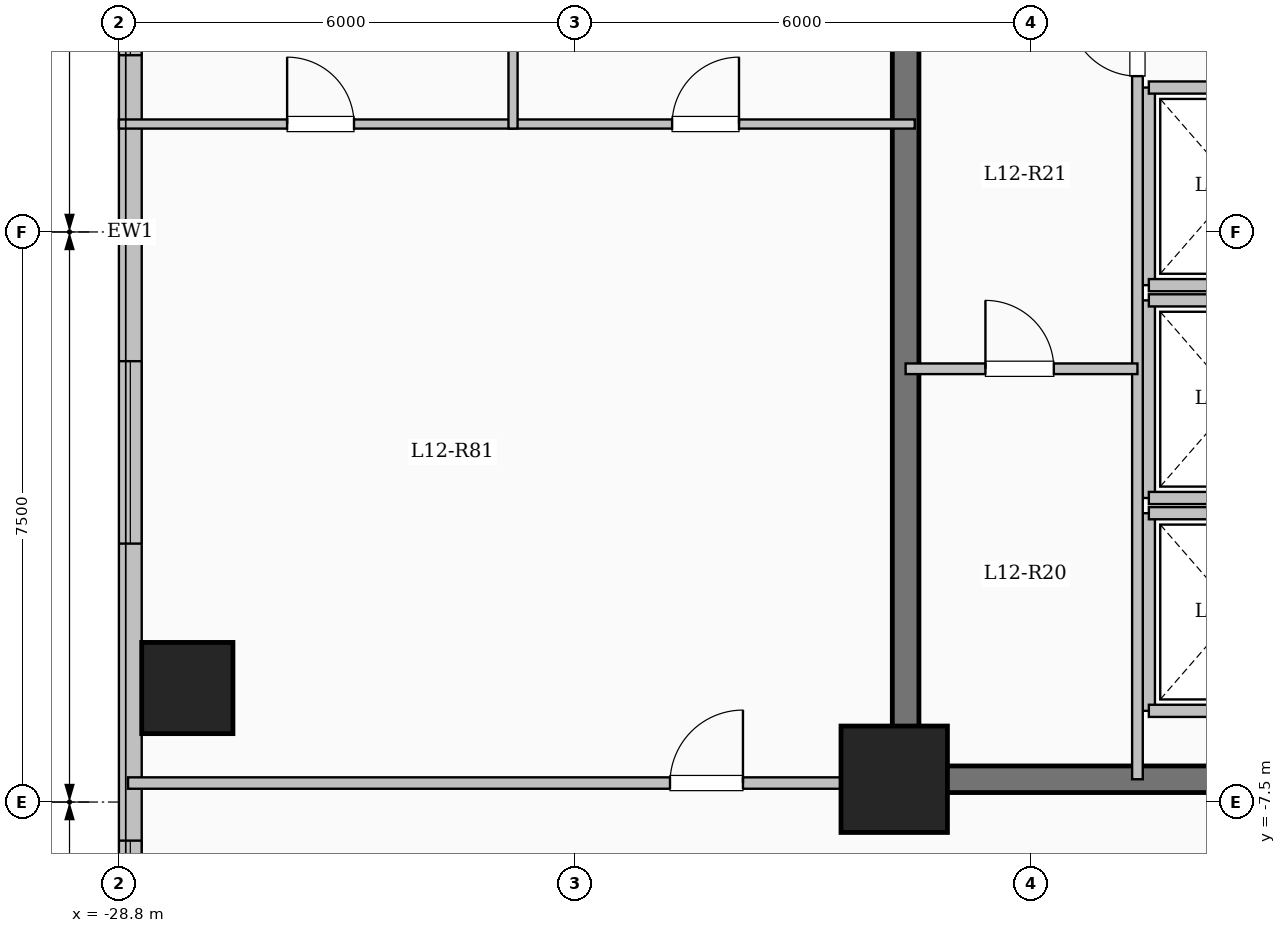
"""IFC4 building model, lengths in metres.
Left out: names, types, materials, properties, quantities, classifications, styles, units other than length and angle.
Written with IfcOpenShell. Run it as: python <this file> out.ifc"""

import sys

from ifc_helpers import new_model, si_unit, direction, frame, frame_2d, origin, origin_2d, place, context, subcontext, project, spatial, rectangle, extrude, element, fill, save


model = new_model("IFC4")
c1 = context("Model", 3, precision=1e-05, world=origin(), true_north=direction((0.0, 1.0)))
c2 = subcontext(c1, "Body", "Model", "MODEL_VIEW")
j1 = project(units=[si_unit("LENGTHUNIT", "METRE"), si_unit("PLANEANGLEUNIT", "RADIAN")], contexts=[c1])
p1 = place(None, origin())
s1 = spatial("IfcSite", under=j1, at=p1, CompositionType="ELEMENT")
p2 = place(p1, origin())
s2 = spatial("IfcBuilding", under=s1, at=p2, CompositionType="ELEMENT")
p3 = place(p2, frame((0.0, 0.0, 47.45)))
s3 = spatial("IfcBuildingStorey", under=s2, at=p3, CompositionType="ELEMENT", Elevation=47.45)
p4 = place(p3, frame((-18.6, -7.2, 0.0), z_axis=(0.0, 0.0, 1.0), x_axis=(1.0, 0.0, 0.0)))
e1 = element("IfcColumn", 1, at=p4, inside=s3, PredefinedType="COLUMN", context=c2, shape_type="SweptSolid", body=[
    extrude(rectangle(XDim=1.4, YDim=1.4, at=origin_2d()), origin(), (0.0, 0.0, 1.0), 3.35),
])
p5 = place(p3, frame((-27.9, -6.0, 0.0), z_axis=(0.0, 0.0, 1.0), x_axis=(1.0, 0.0, 0.0)))
e2 = element("IfcColumn", 2, at=p5, inside=s3, PredefinedType="COLUMN", context=c2, shape_type="SweptSolid", body=[
    extrude(rectangle(XDim=1.2, YDim=1.2, at=origin_2d()), origin(), (0.0, 0.0, 1.0), 3.35),
])
p6 = place(p3, frame((-28.65, -19.05, 0.0), z_axis=(0.0, 0.0, 1.0), x_axis=(0.0, 1.0, 0.0)))
e3 = element("IfcWall", 3, at=p6, inside=s3, PredefinedType="SOLIDWALL", context=c2, shape_type="SweptSolid", body=[
    extrude(rectangle(XDim=38.1, YDim=0.3, at=frame_2d((19.05, 0.0))), origin(), (0.0, 0.0, 1.0), 3.1),
])
p7 = place(p6, frame((3.15, 0.0, 0.9)))
e4 = element("IfcOpeningElement", 4, at=p7, cuts=e3, PredefinedType="OPENING", context=c2, shape_type="SweptSolid", body=[
    extrude(rectangle(XDim=2.4, YDim=1.8, at=frame_2d((1.2, 0.9))), frame((0.0, 0.16, 0.0), z_axis=(0.0, -1.0, 0.0), x_axis=(1.0, 0.0, 0.0)), (0.0, 0.0, 1.0), 0.32),
])
p8 = place(p6, frame((9.542, 0.0, 0.9)))
e5 = element("IfcOpeningElement", 5, at=p8, cuts=e3, PredefinedType="OPENING", context=c2, shape_type="SweptSolid", body=[
    extrude(rectangle(XDim=1.5, YDim=1.65, at=frame_2d((0.75, 0.825))), frame((0.0, 0.16, 0.0), z_axis=(0.0, -1.0, 0.0), x_axis=(1.0, 0.0, 0.0)), (0.0, 0.0, 1.0), 0.32),
])
p9 = place(p6, frame((14.95, 0.0, 0.9)))
e6 = element("IfcOpeningElement", 6, at=p9, cuts=e3, PredefinedType="OPENING", context=c2, shape_type="SweptSolid", body=[
    extrude(rectangle(XDim=2.4, YDim=1.8, at=frame_2d((1.2, 0.9))), frame((0.0, 0.16, 0.0), z_axis=(0.0, -1.0, 0.0), x_axis=(1.0, 0.0, 0.0)), (0.0, 0.0, 1.0), 0.32),
])
p10 = place(p6, frame((21.375, 0.0, 0.9)))
e7 = element("IfcOpeningElement", 7, at=p10, cuts=e3, PredefinedType="OPENING", context=c2, shape_type="SweptSolid", body=[
    extrude(rectangle(XDim=1.8, YDim=1.65, at=frame_2d((0.9, 0.825))), frame((0.0, 0.16, 0.0), z_axis=(0.0, -1.0, 0.0), x_axis=(1.0, 0.0, 0.0)), (0.0, 0.0, 1.0), 0.32),
])
p11 = place(p6, frame((25.925, 0.0, 0.9)))
e8 = element("IfcOpeningElement", 8, at=p11, cuts=e3, PredefinedType="OPENING", context=c2, shape_type="SweptSolid", body=[
    extrude(rectangle(XDim=2.0, YDim=1.7, at=frame_2d((1.0, 0.85))), frame((0.0, 0.16, 0.0), z_axis=(0.0, -1.0, 0.0), x_axis=(1.0, 0.0, 0.0)), (0.0, 0.0, 1.0), 0.32),
])
p12 = place(p6, frame((30.175, 0.0, 0.95)))
e9 = element("IfcOpeningElement", 9, at=p12, cuts=e3, PredefinedType="OPENING", context=c2, shape_type="SweptSolid", body=[
    extrude(rectangle(XDim=1.0, YDim=1.5, at=frame_2d((0.5, 0.75))), frame((0.0, 0.16, 0.0), z_axis=(0.0, -1.0, 0.0), x_axis=(1.0, 0.0, 0.0)), (0.0, 0.0, 1.0), 0.32),
])
p13 = place(p6, frame((33.85, 0.0, 0.9)))
e10 = element("IfcOpeningElement", 10, at=p13, cuts=e3, PredefinedType="OPENING", context=c2, shape_type="SweptSolid", body=[
    extrude(rectangle(XDim=2.0, YDim=1.7, at=frame_2d((1.0, 0.85))), frame((0.0, 0.16, 0.0), z_axis=(0.0, -1.0, 0.0), x_axis=(1.0, 0.0, 0.0)), (0.0, 0.0, 1.0), 0.32),
])
p14 = place(p3, frame((-15.25, -6.3, 0.0), z_axis=(0.0, 0.0, 1.0), x_axis=(0.0, 1.0, 0.0)))
e11 = element("IfcWall", 11, at=p14, inside=s3, PredefinedType="SOLIDWALL", context=c2, shape_type="SweptSolid", body=[
    extrude(rectangle(XDim=2.6, YDim=0.16, at=frame_2d((1.3, 0.0))), origin(), (0.0, 0.0, 1.0), 3.1),
])
for number, where, z_axis, x_axis in (
    (12, (-15.25, -6.3, 0.0), (0.0, 0.0, 1.0), (1.0, 0.0, 0.0)),
    (13, (-15.25, -3.7, 0.0), (0.0, 0.0, 1.0), (1.0, 0.0, 0.0)),
):
    element("IfcWall", number, at=place(p3, frame(where, z_axis=z_axis, x_axis=x_axis)), inside=s3, PredefinedType="SOLIDWALL", context=c2, shape_type="SweptSolid", body=[
        extrude(rectangle(XDim=2.3, YDim=0.16, at=frame_2d((1.15, 0.0))), origin(), (0.0, 0.0, 1.0), 3.1),
    ])
p15 = place(p3, frame((-15.25, -3.5, 0.0), z_axis=(0.0, 0.0, 1.0), x_axis=(0.0, 1.0, 0.0)))
e14 = element("IfcWall", 14, at=p15, inside=s3, PredefinedType="SOLIDWALL", context=c2, shape_type="SweptSolid", body=[
    extrude(rectangle(XDim=2.6, YDim=0.16, at=frame_2d((1.3, 0.0))), origin(), (0.0, 0.0, 1.0), 3.1),
])
for number, where, z_axis, x_axis in (
    (15, (-15.25, -3.5, 0.0), (0.0, 0.0, 1.0), (1.0, 0.0, 0.0)),
    (16, (-15.25, -0.9, 0.0), (0.0, 0.0, 1.0), (1.0, 0.0, 0.0)),
):
    element("IfcWall", number, at=place(p3, frame(where, z_axis=z_axis, x_axis=x_axis)), inside=s3, PredefinedType="SOLIDWALL", context=c2, shape_type="SweptSolid", body=[
        extrude(rectangle(XDim=2.3, YDim=0.16, at=frame_2d((1.15, 0.0))), origin(), (0.0, 0.0, 1.0), 3.1),
    ])
p16 = place(p3, frame((-15.25, -0.7, 0.0), z_axis=(0.0, 0.0, 1.0), x_axis=(0.0, 1.0, 0.0)))
e17 = element("IfcWall", 17, at=p16, inside=s3, PredefinedType="SOLIDWALL", context=c2, shape_type="SweptSolid", body=[
    extrude(rectangle(XDim=2.6, YDim=0.16, at=frame_2d((1.3, 0.0))), origin(), (0.0, 0.0, 1.0), 3.1),
])
for number, where, z_axis, x_axis in (
    (18, (-15.25, -0.7, 0.0), (0.0, 0.0, 1.0), (1.0, 0.0, 0.0)),
    (19, (-15.25, 1.9, 0.0), (0.0, 0.0, 1.0), (1.0, 0.0, 0.0)),
):
    element("IfcWall", number, at=place(p3, frame(where, z_axis=z_axis, x_axis=x_axis)), inside=s3, PredefinedType="SOLIDWALL", context=c2, shape_type="SweptSolid", body=[
        extrude(rectangle(XDim=2.3, YDim=0.16, at=frame_2d((1.15, 0.0))), origin(), (0.0, 0.0, 1.0), 3.1),
    ])
p17 = place(p3, frame((-18.45, -7.375, 0.0), z_axis=(0.0, 0.0, 1.0), x_axis=(0.0, 1.0, 0.0)))
e20 = element("IfcWall", 20, at=p17, inside=s3, PredefinedType="SHEAR", context=c2, shape_type="SweptSolid", body=[
    extrude(rectangle(XDim=14.05, YDim=0.35, at=frame_2d((7.025, 0.0))), origin(), (0.0, 0.0, 1.0), 3.35),
])
p18 = place(p3, frame((-18.625, -7.2, 0.0), z_axis=(0.0, 0.0, 1.0), x_axis=(1.0, 0.0, 0.0)))
e21 = element("IfcWall", 21, at=p18, inside=s3, PredefinedType="SHEAR", context=c2, shape_type="SweptSolid", body=[
    extrude(rectangle(XDim=8.55, YDim=0.35, at=frame_2d((4.275, 0.0))), origin(), (0.0, 0.0, 1.0), 3.35),
])
p19 = place(p3, frame((-15.4, -7.2, 0.0), z_axis=(0.0, 0.0, 1.0), x_axis=(0.0, 1.0, 0.0)))
e22 = element("IfcWall", 22, at=p19, inside=s3, PredefinedType="PARTITIONING", context=c2, shape_type="SweptSolid", body=[
    extrude(rectangle(XDim=10.45, YDim=0.14, at=frame_2d((5.225, 0.0))), origin(), (0.0, 0.0, 1.0), 3.1),
])
p20 = place(p19, frame((9.25, 0.0, 0.0)))
e23 = element("IfcOpeningElement", 23, at=p20, cuts=e22, PredefinedType="OPENING", context=c2, shape_type="SweptSolid", body=[
    extrude(rectangle(XDim=0.9, YDim=2.08, at=frame_2d((0.45, 1.04))), frame((0.0, 0.08, 0.0), z_axis=(0.0, -1.0, 0.0), x_axis=(1.0, 0.0, 0.0)), (0.0, 0.0, 1.0), 0.16),
])
p21 = place(p3, frame((-18.45, -1.8, 0.0), z_axis=(0.0, 0.0, 1.0), x_axis=(1.0, 0.0, 0.0)))
e24 = element("IfcWall", 24, at=p21, inside=s3, PredefinedType="PARTITIONING", context=c2, shape_type="SweptSolid", body=[
    extrude(rectangle(XDim=3.05, YDim=0.14, at=frame_2d((1.525, 0.0))), origin(), (0.0, 0.0, 1.0), 3.1),
])
p22 = place(p21, frame((1.05, 0.0, 0.0)))
e25 = element("IfcOpeningElement", 25, at=p22, cuts=e24, PredefinedType="OPENING", context=c2, shape_type="SweptSolid", body=[
    extrude(rectangle(XDim=0.9, YDim=2.08, at=frame_2d((0.45, 1.04))), frame((0.0, 0.08, 0.0), z_axis=(0.0, -1.0, 0.0), x_axis=(1.0, 0.0, 0.0)), (0.0, 0.0, 1.0), 0.16),
])
p23 = place(p3, frame((-28.68, -7.25, 0.0), z_axis=(0.0, 0.0, 1.0), x_axis=(1.0, 0.0, 0.0)))
e26 = element("IfcWall", 26, at=p23, inside=s3, PredefinedType="PARTITIONING", context=c2, shape_type="SweptSolid", body=[
    extrude(rectangle(XDim=10.23, YDim=0.15, at=frame_2d((5.115, 0.0))), origin(), (0.0, 0.0, 1.0), 3.1),
])
p24 = place(p23, frame((7.13, 0.0, 0.0)))
e27 = element("IfcOpeningElement", 27, at=p24, cuts=e26, PredefinedType="OPENING", context=c2, shape_type="SweptSolid", body=[
    extrude(rectangle(XDim=0.96, YDim=2.15, at=frame_2d((0.48, 1.075))), frame((0.0, 0.085, 0.0), z_axis=(0.0, -1.0, 0.0), x_axis=(1.0, 0.0, 0.0)), (0.0, 0.0, 1.0), 0.17),
])
p25 = place(p3, frame((-28.8, 1.42, 0.0), z_axis=(0.0, 0.0, 1.0), x_axis=(1.0, 0.0, 0.0)))
e28 = element("IfcWall", 28, at=p25, inside=s3, PredefinedType="PARTITIONING", context=c2, shape_type="SweptSolid", body=[
    extrude(rectangle(XDim=10.47, YDim=0.12, at=frame_2d((5.235, 0.0))), origin(), (0.0, 0.0, 1.0), 3.1),
])
p26 = place(p25, frame((2.213, 0.0, 0.0)))
e29 = element("IfcOpeningElement", 29, at=p26, cuts=e28, PredefinedType="OPENING", context=c2, shape_type="SweptSolid", body=[
    extrude(rectangle(XDim=0.88, YDim=2.1, at=frame_2d((0.44, 1.05))), frame((0.0, 0.07, 0.0), z_axis=(0.0, -1.0, 0.0), x_axis=(1.0, 0.0, 0.0)), (0.0, 0.0, 1.0), 0.14),
])
p27 = place(p25, frame((7.278, 0.0, 0.0)))
e30 = element("IfcOpeningElement", 30, at=p27, cuts=e28, PredefinedType="OPENING", context=c2, shape_type="SweptSolid", body=[
    extrude(rectangle(XDim=0.88, YDim=2.1, at=frame_2d((0.44, 1.05))), frame((0.0, 0.07, 0.0), z_axis=(0.0, -1.0, 0.0), x_axis=(1.0, 0.0, 0.0)), (0.0, 0.0, 1.0), 0.14),
])
p28 = place(p3, frame((-23.615, 1.36, 0.0), z_axis=(0.0, 0.0, 1.0), x_axis=(0.0, 1.0, 0.0)))
e31 = element("IfcWall", 31, at=p28, inside=s3, PredefinedType="PARTITIONING", context=c2, shape_type="SweptSolid", body=[
    extrude(rectangle(XDim=3.58, YDim=0.12, at=frame_2d((1.79, 0.0))), origin(), (0.0, 0.0, 1.0), 3.1),
])
p29 = place(p8, origin())
e32 = element("IfcWindow", 32, at=p29, inside=s3, PartitioningType="SINGLE_PANEL", PredefinedType="WINDOW", context=c2, shape_type="SweptSolid", body=[
    extrude(rectangle(XDim=1.5, YDim=1.65, at=frame_2d((0.75, 0.825))), frame((0.0, 0.03, 0.0), z_axis=(0.0, -1.0, 0.0), x_axis=(1.0, 0.0, 0.0)), (0.0, 0.0, 1.0), 0.06),
])
fill(e5, e32)
p30 = place(p9, origin())
e33 = element("IfcWindow", 33, at=p30, inside=s3, PartitioningType="SINGLE_PANEL", PredefinedType="WINDOW", context=c2, shape_type="SweptSolid", body=[
    extrude(rectangle(XDim=2.4, YDim=1.8, at=frame_2d((1.2, 0.9))), frame((0.0, 0.03, 0.0), z_axis=(0.0, -1.0, 0.0), x_axis=(1.0, 0.0, 0.0)), (0.0, 0.0, 1.0), 0.06),
])
fill(e6, e33)
p31 = place(p10, origin())
e34 = element("IfcWindow", 34, at=p31, inside=s3, PartitioningType="SINGLE_PANEL", PredefinedType="WINDOW", context=c2, shape_type="SweptSolid", body=[
    extrude(rectangle(XDim=1.8, YDim=1.65, at=frame_2d((0.9, 0.825))), frame((0.0, 0.03, 0.0), z_axis=(0.0, -1.0, 0.0), x_axis=(1.0, 0.0, 0.0)), (0.0, 0.0, 1.0), 0.06),
])
fill(e7, e34)
p32 = place(p20, origin())
e35 = element("IfcDoor", 35, at=p32, inside=s3, OperationType="SINGLE_SWING_RIGHT", PredefinedType="DOOR", context=c2, shape_type="SweptSolid", body=[
    extrude(rectangle(XDim=0.9, YDim=2.08, at=frame_2d((0.45, 1.04))), frame((0.0, 0.025, 0.0), z_axis=(0.0, -1.0, 0.0), x_axis=(1.0, 0.0, 0.0)), (0.0, 0.0, 1.0), 0.05),
])
fill(e23, e35)
p33 = place(p22, origin())
e36 = element("IfcDoor", 36, at=p33, inside=s3, OperationType="SINGLE_SWING_LEFT", PredefinedType="DOOR", context=c2, shape_type="SweptSolid", body=[
    extrude(rectangle(XDim=0.9, YDim=2.08, at=frame_2d((0.45, 1.04))), frame((0.0, 0.025, 0.0), z_axis=(0.0, -1.0, 0.0), x_axis=(1.0, 0.0, 0.0)), (0.0, 0.0, 1.0), 0.05),
])
fill(e25, e36)
p34 = place(p24, origin())
e37 = element("IfcDoor", 37, at=p34, inside=s3, OperationType="SINGLE_SWING_RIGHT", PredefinedType="DOOR", context=c2, shape_type="SweptSolid", body=[
    extrude(rectangle(XDim=0.96, YDim=2.15, at=frame_2d((0.48, 1.075))), frame((0.0, 0.025, 0.0), z_axis=(0.0, -1.0, 0.0), x_axis=(1.0, 0.0, 0.0)), (0.0, 0.0, 1.0), 0.05),
])
fill(e27, e37)
p35 = place(p26, origin())
e38 = element("IfcDoor", 38, at=p35, inside=s3, OperationType="SINGLE_SWING_LEFT", PredefinedType="DOOR", context=c2, shape_type="SweptSolid", body=[
    extrude(rectangle(XDim=0.88, YDim=2.1, at=frame_2d((0.44, 1.05))), frame((0.0, 0.025, 0.0), z_axis=(0.0, -1.0, 0.0), x_axis=(1.0, 0.0, 0.0)), (0.0, 0.0, 1.0), 0.05),
])
fill(e29, e38)
p36 = place(p27, origin())
e39 = element("IfcDoor", 39, at=p36, inside=s3, OperationType="SINGLE_SWING_RIGHT", PredefinedType="DOOR", context=c2, shape_type="SweptSolid", body=[
    extrude(rectangle(XDim=0.88, YDim=2.1, at=frame_2d((0.44, 1.05))), frame((0.0, 0.025, 0.0), z_axis=(0.0, -1.0, 0.0), x_axis=(1.0, 0.0, 0.0)), (0.0, 0.0, 1.0), 0.05),
])
fill(e30, e39)
save(model, sys.argv[1])
